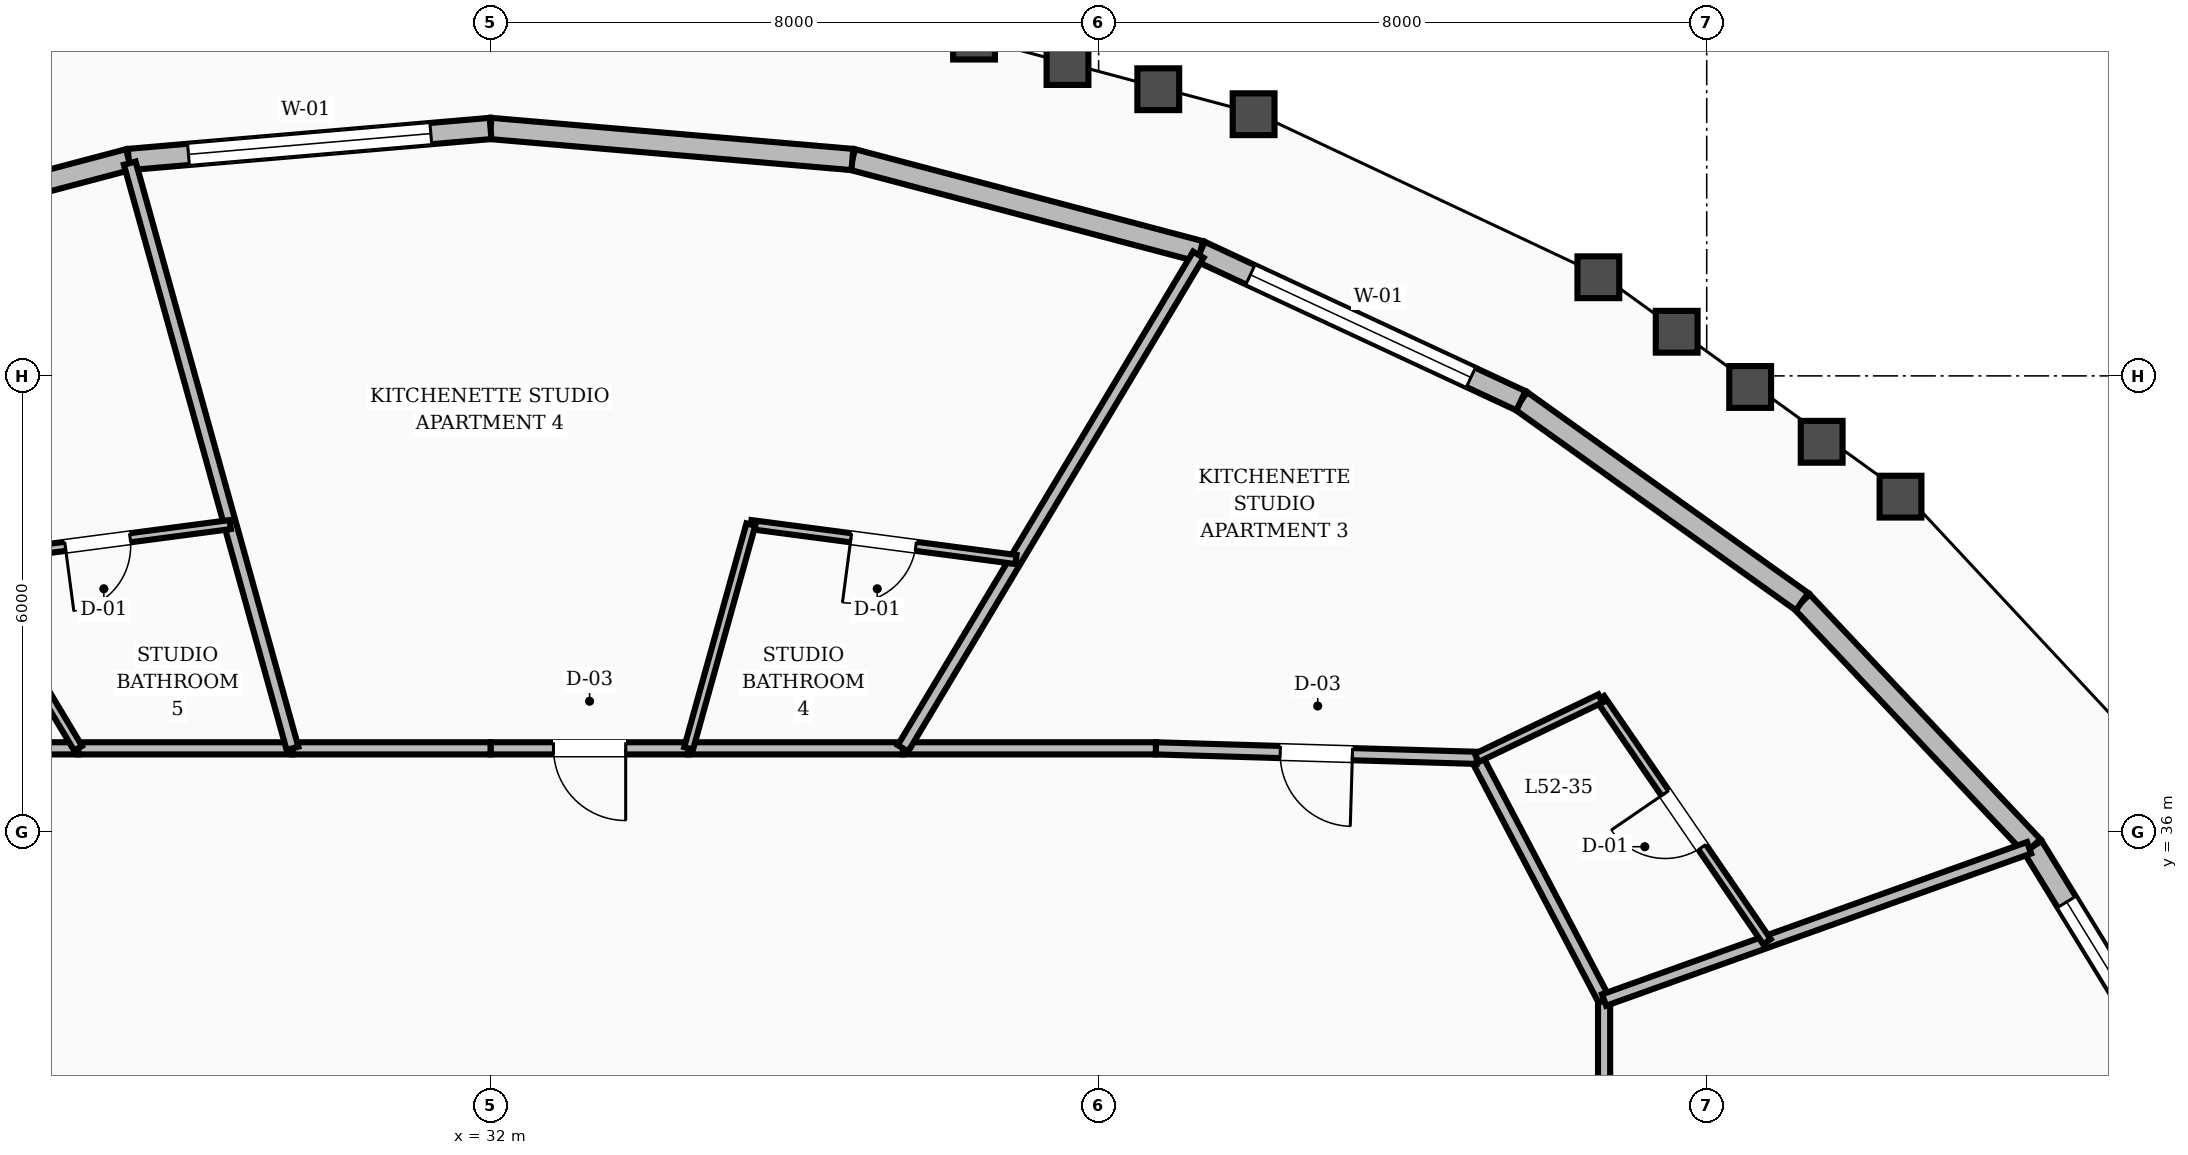
"""IFC4 building model, lengths in metres.
Left out: names, types, materials, properties, quantities, classifications, styles, units other than length and angle.
Written with IfcOpenShell. Run it as: python <this file> out.ifc"""

import sys

from ifc_helpers import new_model, si_unit, direction, frame, frame_2d, origin, place, context, subcontext, project, spatial, rectangle, extrude, element, fill, save


model = new_model("IFC4")
c1 = context("Model", 3, precision=1e-05, world=origin(), true_north=direction((0.0, 1.0)))
c2 = subcontext(c1, "Body", "Model", "MODEL_VIEW")
j1 = project(units=[si_unit("LENGTHUNIT", "METRE"), si_unit("PLANEANGLEUNIT", "RADIAN")], contexts=[c1])
p1 = place(None, origin())
s1 = spatial("IfcSite", under=j1, at=p1, CompositionType="ELEMENT")
p2 = place(p1, origin())
s2 = spatial("IfcBuilding", under=s1, at=p2, CompositionType="ELEMENT")
p3 = place(p2, frame((0.0, 0.0, 200.0)))
s3 = spatial("IfcBuildingStorey", under=s2, at=p3, CompositionType="ELEMENT", Elevation=200.0)
p4 = place(p3, frame((54.543, 32.134, 0.0), z_axis=(0.0, 0.0, 1.0), x_axis=(-0.522997521468, 0.852334202375, 0.0)))
e1 = element("IfcWall", 1, at=p4, inside=s3, PredefinedType="STANDARD", context=c2, shape_type="SweptSolid", body=[
    extrude(rectangle(XDim=4.312, YDim=0.28, at=frame_2d((2.156, 0.0))), origin(), (0.0, 0.0, 1.0), 2.77),
])
p5 = place(p4, frame((0.856, 0.0, 0.8)))
e2 = element("IfcOpeningElement", 2, at=p5, cuts=e1, PredefinedType="OPENING", context=c2, shape_type="SweptSolid", body=[
    extrude(rectangle(XDim=2.6, YDim=1.65, at=frame_2d((1.3, 0.825))), frame((0.0, 0.15, 0.0), z_axis=(0.0, -1.0, 0.0), x_axis=(1.0, 0.0, 0.0)), (0.0, 0.0, 1.0), 0.3),
])
p6 = place(p3, frame((52.288, 35.809, 0.0), z_axis=(0.0, 0.0, 1.0), x_axis=(-0.685717407763, 0.727867870352, 0.0)))
e3 = element("IfcWall", 3, at=p6, inside=s3, PredefinedType="STANDARD", context=c2, shape_type="SweptSolid", body=[
    extrude(rectangle(XDim=4.425, YDim=0.28, at=frame_2d((2.213, 0.0))), origin(), (0.0, 0.0, 1.0), 2.77),
])
p7 = place(p3, frame((49.254, 39.03, 0.0), z_axis=(0.0, 0.0, 1.0), x_axis=(-0.813519294528, 0.581537924327, 0.0)))
e4 = element("IfcWall", 4, at=p7, inside=s3, PredefinedType="STANDARD", context=c2, shape_type="SweptSolid", body=[
    extrude(rectangle(XDim=4.545, YDim=0.28, at=frame_2d((2.273, 0.0))), origin(), (0.0, 0.0, 1.0), 2.77),
])
p8 = place(p3, frame((45.556, 41.673, 0.0), z_axis=(0.0, 0.0, 1.0), x_axis=(-0.906555409807, 0.422086826315, 0.0)))
e5 = element("IfcWall", 5, at=p8, inside=s3, PredefinedType="STANDARD", context=c2, shape_type="SweptSolid", body=[
    extrude(rectangle(XDim=4.653, YDim=0.28, at=frame_2d((2.327, 0.0))), origin(), (0.0, 0.0, 1.0), 2.77),
])
p9 = place(p8, frame((0.727, 0.0, 0.8)))
e6 = element("IfcOpeningElement", 6, at=p9, cuts=e5, PredefinedType="OPENING", context=c2, shape_type="SweptSolid", body=[
    extrude(rectangle(XDim=3.2, YDim=1.65, at=frame_2d((1.6, 0.825))), frame((0.0, 0.15, 0.0), z_axis=(0.0, -1.0, 0.0), x_axis=(1.0, 0.0, 0.0)), (0.0, 0.0, 1.0), 0.3),
])
p10 = place(p3, frame((41.338, 43.637, 0.0), z_axis=(0.0, 0.0, 1.0), x_axis=(-0.966819561224, 0.255460243549, 0.0)))
e7 = element("IfcWall", 7, at=p10, inside=s3, PredefinedType="STANDARD", context=c2, shape_type="SweptSolid", body=[
    extrude(rectangle(XDim=4.734, YDim=0.28, at=frame_2d((2.367, 0.0))), origin(), (0.0, 0.0, 1.0), 2.77),
])
p11 = place(p3, frame((36.76, 44.847, 0.0), z_axis=(0.0, 0.0, 1.0), x_axis=(-0.996339067147, 0.085489550689, 0.0)))
e8 = element("IfcWall", 8, at=p11, inside=s3, PredefinedType="STANDARD", context=c2, shape_type="SweptSolid", body=[
    extrude(rectangle(XDim=4.778, YDim=0.28, at=frame_2d((2.389, 0.0))), origin(), (0.0, 0.0, 1.0), 2.77),
])
p12 = place(p3, frame((32.0, 45.255, 0.0), z_axis=(0.0, 0.0, 1.0), x_axis=(-0.996339067147, -0.085489550689, 0.0)))
e9 = element("IfcWall", 9, at=p12, inside=s3, PredefinedType="STANDARD", context=c2, shape_type="SweptSolid", body=[
    extrude(rectangle(XDim=4.778, YDim=0.28, at=frame_2d((2.389, 0.0))), origin(), (0.0, 0.0, 1.0), 2.77),
])
p13 = place(p12, frame((0.789, 0.0, 0.8)))
e10 = element("IfcOpeningElement", 10, at=p13, cuts=e9, PredefinedType="OPENING", context=c2, shape_type="SweptSolid", body=[
    extrude(rectangle(XDim=3.2, YDim=1.65, at=frame_2d((1.6, 0.825))), frame((0.0, 0.15, 0.0), z_axis=(0.0, -1.0, 0.0), x_axis=(1.0, 0.0, 0.0)), (0.0, 0.0, 1.0), 0.3),
])
p14 = place(p3, frame((27.24, 44.847, 0.0), z_axis=(0.0, 0.0, 1.0), x_axis=(-0.966819561224, -0.255460243549, 0.0)))
e11 = element("IfcWall", 11, at=p14, inside=s3, PredefinedType="STANDARD", context=c2, shape_type="SweptSolid", body=[
    extrude(rectangle(XDim=4.734, YDim=0.28, at=frame_2d((2.367, 0.0))), origin(), (0.0, 0.0, 1.0), 2.77),
])
p15 = place(p3, frame((46.65, 30.068, 0.0), z_axis=(0.0, 0.0, 1.0), x_axis=(0.0, 1.0, 0.0)))
e12 = element("IfcWall", 12, at=p15, inside=s3, PredefinedType="SOLIDWALL", context=c2, shape_type="SweptSolid", body=[
    extrude(rectangle(XDim=3.721, YDim=0.16, at=frame_2d((1.86, 0.0))), origin(), (0.0, 0.0, 1.0), 2.75),
])
p16 = place(p3, frame((46.65, 33.789, 0.0), z_axis=(0.0, 0.0, 1.0), x_axis=(-0.46527115782, 0.885168204185, 0.0)))
e13 = element("IfcWall", 13, at=p16, inside=s3, PredefinedType="SOLIDWALL", context=c2, shape_type="SweptSolid", body=[
    extrude(rectangle(XDim=3.6, YDim=0.16, at=frame_2d((1.8, 0.0))), origin(), (0.0, 0.0, 1.0), 2.75),
])
p17 = place(p3, frame((44.975, 36.975, 0.0), z_axis=(0.0, 0.0, 1.0), x_axis=(-0.999561990195, 0.029594387265, 0.0)))
e14 = element("IfcWall", 14, at=p17, inside=s3, PredefinedType="SOLIDWALL", context=c2, shape_type="SweptSolid", body=[
    extrude(rectangle(XDim=4.224, YDim=0.16, at=frame_2d((2.112, 0.0))), origin(), (0.0, 0.0, 1.0), 2.75),
])
p18 = place(p17, frame((1.637, 0.0, 0.0)))
e15 = element("IfcOpeningElement", 15, at=p18, cuts=e14, PredefinedType="OPENING", context=c2, shape_type="SweptSolid", body=[
    extrude(rectangle(XDim=0.95, YDim=2.1, at=frame_2d((0.475, 1.05))), frame((0.0, 0.09, 0.0), z_axis=(0.0, -1.0, 0.0), x_axis=(1.0, 0.0, 0.0)), (0.0, 0.0, 1.0), 0.18),
])
p19 = place(p3, frame((40.753, 37.1, 0.0), z_axis=(0.0, 0.0, 1.0), x_axis=(-1.0, 0.0, 0.0)))
e16 = element("IfcWall", 16, at=p19, inside=s3, PredefinedType="SOLIDWALL", context=c2, shape_type="SweptSolid", body=[
    extrude(rectangle(XDim=3.327, YDim=0.16, at=frame_2d((1.664, 0.0))), origin(), (0.0, 0.0, 1.0), 2.75),
])
p20 = place(p3, frame((37.426, 37.1, 0.0), z_axis=(0.0, 0.0, 1.0), x_axis=(-1.0, 0.0, 0.0)))
e17 = element("IfcWall", 17, at=p20, inside=s3, PredefinedType="SOLIDWALL", context=c2, shape_type="SweptSolid", body=[
    extrude(rectangle(XDim=2.821, YDim=0.16, at=frame_2d((1.41, 0.0))), origin(), (0.0, 0.0, 1.0), 2.75),
])
p21 = place(p3, frame((34.606, 37.1, 0.0), z_axis=(0.0, 0.0, 1.0), x_axis=(-1.0, 0.0, 0.0)))
e18 = element("IfcWall", 18, at=p21, inside=s3, PredefinedType="SOLIDWALL", context=c2, shape_type="SweptSolid", body=[
    extrude(rectangle(XDim=2.606, YDim=0.16, at=frame_2d((1.303, 0.0))), origin(), (0.0, 0.0, 1.0), 2.75),
])
p22 = place(p21, frame((0.828, 0.0, 0.0)))
e19 = element("IfcOpeningElement", 19, at=p22, cuts=e18, PredefinedType="OPENING", context=c2, shape_type="SweptSolid", body=[
    extrude(rectangle(XDim=0.95, YDim=2.1, at=frame_2d((0.475, 1.05))), frame((0.0, 0.09, 0.0), z_axis=(0.0, -1.0, 0.0), x_axis=(1.0, 0.0, 0.0)), (0.0, 0.0, 1.0), 0.18),
])
p23 = place(p3, frame((32.0, 37.1, 0.0), z_axis=(0.0, 0.0, 1.0), x_axis=(-1.0, 0.0, 0.0)))
e20 = element("IfcWall", 20, at=p23, inside=s3, PredefinedType="SOLIDWALL", context=c2, shape_type="SweptSolid", body=[
    extrude(rectangle(XDim=2.606, YDim=0.16, at=frame_2d((1.303, 0.0))), origin(), (0.0, 0.0, 1.0), 2.75),
])
p24 = place(p3, frame((29.394, 37.1, 0.0), z_axis=(0.0, 0.0, 1.0), x_axis=(-1.0, 0.0, 0.0)))
e21 = element("IfcWall", 21, at=p24, inside=s3, PredefinedType="SOLIDWALL", context=c2, shape_type="SweptSolid", body=[
    extrude(rectangle(XDim=2.821, YDim=0.16, at=frame_2d((1.41, 0.0))), origin(), (0.0, 0.0, 1.0), 2.75),
])
p25 = place(p3, frame((26.574, 37.1, 0.0), z_axis=(0.0, 0.0, 1.0), x_axis=(-1.0, 0.0, 0.0)))
e22 = element("IfcWall", 22, at=p25, inside=s3, PredefinedType="SOLIDWALL", context=c2, shape_type="SweptSolid", body=[
    extrude(rectangle(XDim=3.327, YDim=0.16, at=frame_2d((1.664, 0.0))), origin(), (0.0, 0.0, 1.0), 2.75),
])
p26 = place(p25, frame((1.188, 0.0, 0.0)))
e23 = element("IfcOpeningElement", 23, at=p26, cuts=e22, PredefinedType="OPENING", context=c2, shape_type="SweptSolid", body=[
    extrude(rectangle(XDim=0.95, YDim=2.1, at=frame_2d((0.475, 1.05))), frame((0.0, 0.09, 0.0), z_axis=(0.0, -1.0, 0.0), x_axis=(1.0, 0.0, 0.0)), (0.0, 0.0, 1.0), 0.18),
])
p27 = place(p3, frame((46.65, 33.789, 0.0), z_axis=(0.0, 0.0, 1.0), x_axis=(0.941406646074, 0.33727366741, 0.0)))
e24 = element("IfcWall", 24, at=p27, inside=s3, PredefinedType="SOLIDWALL", context=c2, shape_type="SweptSolid", body=[
    extrude(rectangle(XDim=5.939, YDim=0.16, at=frame_2d((2.97, 0.0))), origin(), (0.0, 0.0, 1.0), 2.75),
])
p28 = place(p3, frame((48.792, 34.556, 0.0), z_axis=(0.0, 0.0, 1.0), x_axis=(-0.56513068161, 0.825001401637, 0.0)))
e25 = element("IfcWall", 25, at=p28, inside=s3, PredefinedType="PARTITIONING", context=c2, shape_type="SweptSolid", body=[
    extrude(rectangle(XDim=3.878, YDim=0.12, at=frame_2d((1.939, 0.0))), origin(), (0.0, 0.0, 1.0), 2.75),
])
p29 = place(p28, frame((1.509, 0.0, 0.0)))
e26 = element("IfcOpeningElement", 26, at=p29, cuts=e25, PredefinedType="OPENING", context=c2, shape_type="SweptSolid", body=[
    extrude(rectangle(XDim=0.86, YDim=2.1, at=frame_2d((0.43, 1.05))), frame((0.0, 0.07, 0.0), z_axis=(0.0, -1.0, 0.0), x_axis=(1.0, 0.0, 0.0)), (0.0, 0.0, 1.0), 0.14),
])
p30 = place(p3, frame((44.975, 36.975, 0.0), z_axis=(0.0, 0.0, 1.0), x_axis=(0.90143431694, 0.432915895115, 0.0)))
e27 = element("IfcWall", 27, at=p30, inside=s3, PredefinedType="PARTITIONING", context=c2, shape_type="SweptSolid", body=[
    extrude(rectangle(XDim=1.803, YDim=0.12, at=frame_2d((0.902, 0.0))), origin(), (0.0, 0.0, 1.0), 2.75),
])
p31 = place(p3, frame((37.426, 37.1, 0.0), z_axis=(0.0, 0.0, 1.0), x_axis=(0.513451665376, 0.858118515896, 0.0)))
e28 = element("IfcWall", 28, at=p31, inside=s3, PredefinedType="SOLIDWALL", context=c2, shape_type="SweptSolid", body=[
    extrude(rectangle(XDim=7.568, YDim=0.16, at=frame_2d((3.784, 0.0))), origin(), (0.0, 0.0, 1.0), 2.75),
])
p32 = place(p3, frame((38.913, 39.584, 0.0), z_axis=(0.0, 0.0, 1.0), x_axis=(-0.99142616553, 0.130668122747, 0.0)))
e29 = element("IfcWall", 29, at=p32, inside=s3, PredefinedType="PARTITIONING", context=c2, shape_type="SweptSolid", body=[
    extrude(rectangle(XDim=3.518, YDim=0.12, at=frame_2d((1.759, 0.0))), origin(), (0.0, 0.0, 1.0), 2.75),
])
p33 = place(p32, frame((1.329, 0.0, 0.0)))
e30 = element("IfcOpeningElement", 30, at=p33, cuts=e29, PredefinedType="OPENING", context=c2, shape_type="SweptSolid", body=[
    extrude(rectangle(XDim=0.86, YDim=2.1, at=frame_2d((0.43, 1.05))), frame((0.0, 0.07, 0.0), z_axis=(0.0, -1.0, 0.0), x_axis=(1.0, 0.0, 0.0)), (0.0, 0.0, 1.0), 0.14),
])
p34 = place(p3, frame((34.606, 37.1, 0.0), z_axis=(0.0, 0.0, 1.0), x_axis=(0.268002388825, 0.963418247484, 0.0)))
e31 = element("IfcWall", 31, at=p34, inside=s3, PredefinedType="PARTITIONING", context=c2, shape_type="SweptSolid", body=[
    extrude(rectangle(XDim=3.055, YDim=0.12, at=frame_2d((1.528, 0.0))), origin(), (0.0, 0.0, 1.0), 2.75),
])
p35 = place(p3, frame((29.394, 37.1, 0.0), z_axis=(0.0, 0.0, 1.0), x_axis=(-0.26795113258, 0.963432504408, 0.0)))
e32 = element("IfcWall", 32, at=p35, inside=s3, PredefinedType="SOLIDWALL", context=c2, shape_type="SweptSolid", body=[
    extrude(rectangle(XDim=7.991, YDim=0.16, at=frame_2d((3.995, 0.0))), origin(), (0.0, 0.0, 1.0), 2.75),
])
p36 = place(p3, frame((28.575, 40.044, 0.0), z_axis=(0.0, 0.0, 1.0), x_axis=(-0.99142616553, -0.130668122747, 0.0)))
e33 = element("IfcWall", 33, at=p36, inside=s3, PredefinedType="PARTITIONING", context=c2, shape_type="SweptSolid", body=[
    extrude(rectangle(XDim=3.518, YDim=0.12, at=frame_2d((1.759, 0.0))), origin(), (0.0, 0.0, 1.0), 2.75),
])
p37 = place(p36, frame((1.329, 0.0, 0.0)))
e34 = element("IfcOpeningElement", 34, at=p37, cuts=e33, PredefinedType="OPENING", context=c2, shape_type="SweptSolid", body=[
    extrude(rectangle(XDim=0.86, YDim=2.1, at=frame_2d((0.43, 1.05))), frame((0.0, 0.07, 0.0), z_axis=(0.0, -1.0, 0.0), x_axis=(1.0, 0.0, 0.0)), (0.0, 0.0, 1.0), 0.14),
])
p38 = place(p3, frame((26.574, 37.1, 0.0), z_axis=(0.0, 0.0, 1.0), x_axis=(-0.513478319861, 0.858102566732, 0.0)))
e35 = element("IfcWall", 35, at=p38, inside=s3, PredefinedType="PARTITIONING", context=c2, shape_type="SweptSolid", body=[
    extrude(rectangle(XDim=2.895, YDim=0.12, at=frame_2d((1.447, 0.0))), origin(), (0.0, 0.0, 1.0), 2.75),
])
p39 = place(p5, origin())
e36 = element("IfcWindow", 36, at=p39, inside=s3, PartitioningType="SINGLE_PANEL", PredefinedType="WINDOW", context=c2, shape_type="SweptSolid", body=[
    extrude(rectangle(XDim=2.6, YDim=1.65, at=frame_2d((1.3, 0.825))), frame((0.0, 0.03, 0.0), z_axis=(0.0, -1.0, 0.0), x_axis=(1.0, 0.0, 0.0)), (0.0, 0.0, 1.0), 0.06),
])
fill(e2, e36)
p40 = place(p9, origin())
e37 = element("IfcWindow", 37, at=p40, inside=s3, PartitioningType="SINGLE_PANEL", PredefinedType="WINDOW", context=c2, shape_type="SweptSolid", body=[
    extrude(rectangle(XDim=3.2, YDim=1.65, at=frame_2d((1.6, 0.825))), frame((0.0, 0.03, 0.0), z_axis=(0.0, -1.0, 0.0), x_axis=(1.0, 0.0, 0.0)), (0.0, 0.0, 1.0), 0.06),
])
fill(e6, e37)
p41 = place(p13, origin())
e38 = element("IfcWindow", 38, at=p41, inside=s3, PartitioningType="SINGLE_PANEL", PredefinedType="WINDOW", context=c2, shape_type="SweptSolid", body=[
    extrude(rectangle(XDim=3.2, YDim=1.65, at=frame_2d((1.6, 0.825))), frame((0.0, 0.03, 0.0), z_axis=(0.0, -1.0, 0.0), x_axis=(1.0, 0.0, 0.0)), (0.0, 0.0, 1.0), 0.06),
])
fill(e10, e38)
p42 = place(p29, origin())
e39 = element("IfcDoor", 39, at=p42, inside=s3, OperationType="SINGLE_SWING_RIGHT", PredefinedType="DOOR", context=c2, shape_type="SweptSolid", body=[
    extrude(rectangle(XDim=0.86, YDim=2.1, at=frame_2d((0.43, 1.05))), frame((0.0, 0.025, 0.0), z_axis=(0.0, -1.0, 0.0), x_axis=(1.0, 0.0, 0.0)), (0.0, 0.0, 1.0), 0.05),
])
fill(e26, e39)
p43 = place(p18, origin())
e40 = element("IfcDoor", 40, at=p43, inside=s3, OperationType="SINGLE_SWING_LEFT", PredefinedType="DOOR", context=c2, shape_type="SweptSolid", body=[
    extrude(rectangle(XDim=0.95, YDim=2.1, at=frame_2d((0.475, 1.05))), frame((0.0, 0.025, 0.0), z_axis=(0.0, -1.0, 0.0), x_axis=(1.0, 0.0, 0.0)), (0.0, 0.0, 1.0), 0.05),
])
fill(e15, e40)
p44 = place(p33, origin())
e41 = element("IfcDoor", 41, at=p44, inside=s3, OperationType="SINGLE_SWING_RIGHT", PredefinedType="DOOR", context=c2, shape_type="SweptSolid", body=[
    extrude(rectangle(XDim=0.86, YDim=2.1, at=frame_2d((0.43, 1.05))), frame((0.0, 0.025, 0.0), z_axis=(0.0, -1.0, 0.0), x_axis=(1.0, 0.0, 0.0)), (0.0, 0.0, 1.0), 0.05),
])
fill(e30, e41)
p45 = place(p22, origin())
e42 = element("IfcDoor", 42, at=p45, inside=s3, OperationType="SINGLE_SWING_LEFT", PredefinedType="DOOR", context=c2, shape_type="SweptSolid", body=[
    extrude(rectangle(XDim=0.95, YDim=2.1, at=frame_2d((0.475, 1.05))), frame((0.0, 0.025, 0.0), z_axis=(0.0, -1.0, 0.0), x_axis=(1.0, 0.0, 0.0)), (0.0, 0.0, 1.0), 0.05),
])
fill(e19, e42)
p46 = place(p37, origin())
e43 = element("IfcDoor", 43, at=p46, inside=s3, OperationType="SINGLE_SWING_RIGHT", PredefinedType="DOOR", context=c2, shape_type="SweptSolid", body=[
    extrude(rectangle(XDim=0.86, YDim=2.1, at=frame_2d((0.43, 1.05))), frame((0.0, 0.025, 0.0), z_axis=(0.0, -1.0, 0.0), x_axis=(1.0, 0.0, 0.0)), (0.0, 0.0, 1.0), 0.05),
])
fill(e34, e43)
save(model, sys.argv[1])
